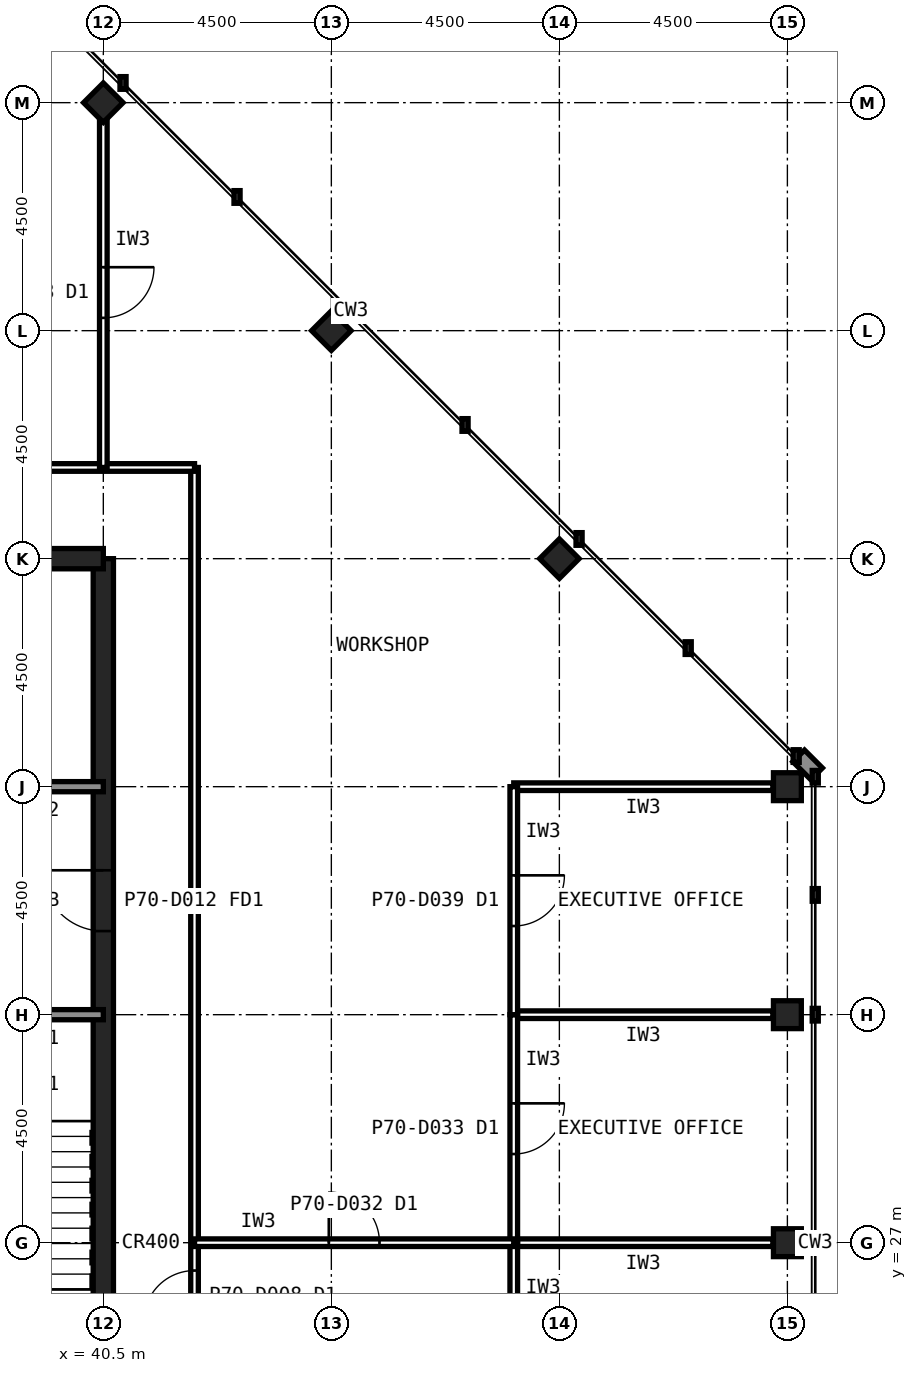
"""IFC4 building model, lengths in metres.
Left out: names, types, materials, properties, quantities, classifications, styles, units other than length and angle.
Written with IfcOpenShell. Run it as: python <this file> out.ifc"""

import sys

from ifc_helpers import new_model, si_unit, direction, frame, frame_2d, origin, origin_2d, place, context, subcontext, project, spatial, rectangle, hollow_rectangle, extrude, element, fill, save


model = new_model("IFC4")
c1 = context("Model", 3, precision=1e-05, world=origin(), true_north=direction((0.0, 1.0)))
c2 = subcontext(c1, "Body", "Model", "MODEL_VIEW")
j1 = project(units=[si_unit("LENGTHUNIT", "METRE"), si_unit("PLANEANGLEUNIT", "RADIAN")], contexts=[c1])
p1 = place(None, origin())
s1 = spatial("IfcSite", under=j1, at=p1, CompositionType="ELEMENT")
p2 = place(p1, origin())
s2 = spatial("IfcBuilding", under=s1, at=p2, CompositionType="ELEMENT")
p3 = place(p2, frame((0.0, 0.0, 294.6)))
s3 = spatial("IfcBuildingStorey", under=s2, at=p3, CompositionType="ELEMENT", Elevation=294.6)
for number, where, z_axis, x_axis in (
    (1, (54.0, 27.0, 0.0), (0.0, 0.0, 1.0), (1.0, 0.0, 0.0)),
    (2, (54.0, 31.5, 0.0), (0.0, 0.0, 1.0), (1.0, 0.0, 0.0)),
    (3, (54.0, 36.0, 0.0), (0.0, 0.0, 1.0), (1.0, 0.0, 0.0)),
    (4, (49.5, 40.5, 0.0), (0.0, 0.0, 1.0), (0.707, 0.707, 0.0)),
    (5, (45.0, 45.0, 0.0), (0.0, 0.0, 1.0), (0.707, 0.707, 0.0)),
    (6, (40.5, 49.5, 0.0), (0.0, 0.0, 1.0), (0.707, 0.707, 0.0)),
):
    element("IfcColumn", number, at=place(p3, frame(where, z_axis=z_axis, x_axis=x_axis)), inside=s3, PredefinedType="COLUMN", context=c2, shape_type="SweptSolid", body=[
        extrude(hollow_rectangle(XDim=0.55, YDim=0.55, WallThickness=0.025, at=origin_2d()), origin(), (0.0, 0.0, 1.0), 4.0),
    ])
p4 = place(p3, frame((40.5, 13.5, 0.0), z_axis=(0.0, 0.0, 1.0), x_axis=(0.0, 1.0, 0.0)))
e7 = element("IfcWall", 7, at=p4, inside=s3, PredefinedType="SHEAR", context=c2, shape_type="SweptSolid", body=[
    extrude(rectangle(XDim=27.0, YDim=0.4, at=frame_2d((13.5, 0.0))), origin(), (0.0, 0.0, 1.0), 4.0),
])
p5 = place(p4, frame((5.85, 0.0, 0.0)))
e8 = element("IfcOpeningElement", 8, at=p5, cuts=e7, PredefinedType="OPENING", context=c2, shape_type="SweptSolid", body=[
    extrude(rectangle(XDim=1.8, YDim=2.1, at=frame_2d((0.9, 1.05))), frame((0.0, 0.21, 0.0), z_axis=(0.0, -1.0, 0.0), x_axis=(1.0, 0.0, 0.0)), (0.0, 0.0, 1.0), 0.42),
])
p6 = place(p4, frame((19.65, 0.0, 0.0)))
e9 = element("IfcOpeningElement", 9, at=p6, cuts=e7, PredefinedType="OPENING", context=c2, shape_type="SweptSolid", body=[
    extrude(rectangle(XDim=1.2, YDim=2.1, at=frame_2d((0.6, 1.05))), frame((0.0, 0.21, 0.0), z_axis=(0.0, -1.0, 0.0), x_axis=(1.0, 0.0, 0.0)), (0.0, 0.0, 1.0), 0.42),
])
p7 = place(p3, frame((40.5, 40.5, 0.0), z_axis=(0.0, 0.0, 1.0), x_axis=(-1.0, 0.0, 0.0)))
e10 = element("IfcWall", 10, at=p7, inside=s3, PredefinedType="SHEAR", context=c2, shape_type="SweptSolid", body=[
    extrude(rectangle(XDim=27.0, YDim=0.4, at=frame_2d((13.5, 0.0))), origin(), (0.0, 0.0, 1.0), 4.0),
])
p8 = place(p3, frame((13.5, 36.0, 0.0), z_axis=(0.0, 0.0, 1.0), x_axis=(1.0, 0.0, 0.0)))
e11 = element("IfcWall", 11, at=p8, inside=s3, PredefinedType="SOLIDWALL", context=c2, shape_type="SweptSolid", body=[
    extrude(rectangle(XDim=27.0, YDim=0.2, at=frame_2d((13.5, 0.0))), origin(), (0.0, 0.0, 1.0), 3.84),
])
p9 = place(p8, frame((1.8, 0.0, 0.0)))
e12 = element("IfcOpeningElement", 12, at=p9, cuts=e11, PredefinedType="OPENING", context=c2, shape_type="SweptSolid", body=[
    extrude(rectangle(XDim=0.9, YDim=2.1, at=frame_2d((0.45, 1.05))), frame((0.0, 0.11, 0.0), z_axis=(0.0, -1.0, 0.0), x_axis=(1.0, 0.0, 0.0)), (0.0, 0.0, 1.0), 0.22),
])
p10 = place(p8, frame((5.55, 0.0, 0.0)))
e13 = element("IfcOpeningElement", 13, at=p10, cuts=e11, PredefinedType="OPENING", context=c2, shape_type="SweptSolid", body=[
    extrude(rectangle(XDim=0.9, YDim=2.1, at=frame_2d((0.45, 1.05))), frame((0.0, 0.11, 0.0), z_axis=(0.0, -1.0, 0.0), x_axis=(1.0, 0.0, 0.0)), (0.0, 0.0, 1.0), 0.22),
])
p11 = place(p8, frame((11.55, 0.0, 0.0)))
e14 = element("IfcOpeningElement", 14, at=p11, cuts=e11, PredefinedType="OPENING", context=c2, shape_type="SweptSolid", body=[
    extrude(rectangle(XDim=0.9, YDim=2.1, at=frame_2d((0.45, 1.05))), frame((0.0, 0.11, 0.0), z_axis=(0.0, -1.0, 0.0), x_axis=(1.0, 0.0, 0.0)), (0.0, 0.0, 1.0), 0.22),
])
p12 = place(p8, frame((14.55, 0.0, 0.0)))
e15 = element("IfcOpeningElement", 15, at=p12, cuts=e11, PredefinedType="OPENING", context=c2, shape_type="SweptSolid", body=[
    extrude(rectangle(XDim=0.9, YDim=2.1, at=frame_2d((0.45, 1.05))), frame((0.0, 0.11, 0.0), z_axis=(0.0, -1.0, 0.0), x_axis=(1.0, 0.0, 0.0)), (0.0, 0.0, 1.0), 0.22),
])
p13 = place(p8, frame((24.1, 0.0, 0.0)))
e16 = element("IfcOpeningElement", 16, at=p13, cuts=e11, PredefinedType="OPENING", context=c2, shape_type="SweptSolid", body=[
    extrude(rectangle(XDim=1.3, YDim=2.2, at=frame_2d((0.65, 1.1))), frame((0.0, 0.11, 0.0), z_axis=(0.0, -1.0, 0.0), x_axis=(1.0, 0.0, 0.0)), (0.0, 0.0, 1.0), 0.22),
])
p14 = place(p3, frame((13.5, 31.5, 0.0), z_axis=(0.0, 0.0, 1.0), x_axis=(1.0, 0.0, 0.0)))
e17 = element("IfcWall", 17, at=p14, inside=s3, PredefinedType="SOLIDWALL", context=c2, shape_type="SweptSolid", body=[
    extrude(rectangle(XDim=27.0, YDim=0.2, at=frame_2d((13.5, 0.0))), origin(), (0.0, 0.0, 1.0), 3.84),
])
p15 = place(p14, frame((24.15, 0.0, 0.0)))
e18 = element("IfcOpeningElement", 18, at=p15, cuts=e17, PredefinedType="OPENING", context=c2, shape_type="SweptSolid", body=[
    extrude(rectangle(XDim=1.2, YDim=2.1, at=frame_2d((0.6, 1.05))), frame((0.0, 0.11, 0.0), z_axis=(0.0, -1.0, 0.0), x_axis=(1.0, 0.0, 0.0)), (0.0, 0.0, 1.0), 0.22),
])
p16 = place(p14, frame((15.3, 0.0, 0.0)))
e19 = element("IfcOpeningElement", 19, at=p16, cuts=e17, PredefinedType="OPENING", context=c2, shape_type="SweptSolid", body=[
    extrude(rectangle(XDim=0.9, YDim=2.1, at=frame_2d((0.45, 1.05))), frame((0.0, 0.11, 0.0), z_axis=(0.0, -1.0, 0.0), x_axis=(1.0, 0.0, 0.0)), (0.0, 0.0, 1.0), 0.22),
])
p17 = place(p14, frame((19.8, 0.0, 0.0)))
e20 = element("IfcOpeningElement", 20, at=p17, cuts=e17, PredefinedType="OPENING", context=c2, shape_type="SweptSolid", body=[
    extrude(rectangle(XDim=0.9, YDim=2.1, at=frame_2d((0.45, 1.05))), frame((0.0, 0.11, 0.0), z_axis=(0.0, -1.0, 0.0), x_axis=(1.0, 0.0, 0.0)), (0.0, 0.0, 1.0), 0.22),
])
p18 = place(p3, frame((42.3, 11.7, 0.0), z_axis=(0.0, 0.0, 1.0), x_axis=(0.0, 1.0, 0.0)))
e21 = element("IfcWall", 21, at=p18, inside=s3, PredefinedType="PARTITIONING", context=c2, shape_type="SweptSolid", body=[
    extrude(rectangle(XDim=30.6, YDim=0.15, at=frame_2d((15.3, 0.0))), origin(), (0.0, 0.0, 1.0), 3.84),
])
p19 = place(p18, frame((13.75, 0.0, 0.0)))
e22 = element("IfcOpeningElement", 22, at=p19, cuts=e21, PredefinedType="OPENING", context=c2, shape_type="SweptSolid", body=[
    extrude(rectangle(XDim=1.0, YDim=2.1, at=frame_2d((0.5, 1.05))), frame((0.0, 0.085, 0.0), z_axis=(0.0, -1.0, 0.0), x_axis=(1.0, 0.0, 0.0)), (0.0, 0.0, 1.0), 0.17),
])
p20 = place(p3, frame((42.3, 42.3, 0.0), z_axis=(0.0, 0.0, 1.0), x_axis=(-1.0, 0.0, 0.0)))
e23 = element("IfcWall", 23, at=p20, inside=s3, PredefinedType="PARTITIONING", context=c2, shape_type="SweptSolid", body=[
    extrude(rectangle(XDim=30.6, YDim=0.15, at=frame_2d((15.3, 0.0))), origin(), (0.0, 0.0, 1.0), 3.84),
])
p21 = place(p20, frame((14.8, 0.0, 0.0)))
e24 = element("IfcOpeningElement", 24, at=p21, cuts=e23, PredefinedType="OPENING", context=c2, shape_type="SweptSolid", body=[
    extrude(rectangle(XDim=1.0, YDim=2.1, at=frame_2d((0.5, 1.05))), frame((0.0, 0.085, 0.0), z_axis=(0.0, -1.0, 0.0), x_axis=(1.0, 0.0, 0.0)), (0.0, 0.0, 1.0), 0.17),
])
p22 = place(p3, frame((53.715, 27.0, 0.0), z_axis=(0.0, 0.0, 1.0), x_axis=(-1.0, 0.0, 0.0)))
e25 = element("IfcWall", 25, at=p22, inside=s3, PredefinedType="PARTITIONING", context=c2, shape_type="SweptSolid", body=[
    extrude(rectangle(XDim=5.115, YDim=0.15, at=frame_2d((2.558, 0.0))), origin(), (0.0, 0.0, 1.0), 2.989),
])
p23 = place(p3, frame((48.6, 27.0, 0.0), z_axis=(0.0, 0.0, 1.0), x_axis=(0.0, -1.0, 0.0)))
e26 = element("IfcWall", 26, at=p23, inside=s3, PredefinedType="PARTITIONING", context=c2, shape_type="SweptSolid", body=[
    extrude(rectangle(XDim=4.5, YDim=0.15, at=frame_2d((2.25, 0.0))), origin(), (0.0, 0.0, 1.0), 3.84),
])
p24 = place(p23, frame((1.75, 0.0, 0.0)))
e27 = element("IfcOpeningElement", 27, at=p24, cuts=e26, PredefinedType="OPENING", context=c2, shape_type="SweptSolid", body=[
    extrude(rectangle(XDim=1.0, YDim=2.1, at=frame_2d((0.5, 1.05))), frame((0.0, 0.085, 0.0), z_axis=(0.0, -1.0, 0.0), x_axis=(1.0, 0.0, 0.0)), (0.0, 0.0, 1.0), 0.17),
])
p25 = place(p3, frame((53.715, 31.5, 0.0), z_axis=(0.0, 0.0, 1.0), x_axis=(-1.0, 0.0, 0.0)))
e28 = element("IfcWall", 28, at=p25, inside=s3, PredefinedType="PARTITIONING", context=c2, shape_type="SweptSolid", body=[
    extrude(rectangle(XDim=5.115, YDim=0.15, at=frame_2d((2.558, 0.0))), origin(), (0.0, 0.0, 1.0), 2.989),
])
p26 = place(p3, frame((48.6, 31.5, 0.0), z_axis=(0.0, 0.0, 1.0), x_axis=(0.0, -1.0, 0.0)))
e29 = element("IfcWall", 29, at=p26, inside=s3, PredefinedType="PARTITIONING", context=c2, shape_type="SweptSolid", body=[
    extrude(rectangle(XDim=4.5, YDim=0.15, at=frame_2d((2.25, 0.0))), origin(), (0.0, 0.0, 1.0), 3.84),
])
p27 = place(p26, frame((1.75, 0.0, 0.0)))
e30 = element("IfcOpeningElement", 30, at=p27, cuts=e29, PredefinedType="OPENING", context=c2, shape_type="SweptSolid", body=[
    extrude(rectangle(XDim=1.0, YDim=2.1, at=frame_2d((0.5, 1.05))), frame((0.0, 0.085, 0.0), z_axis=(0.0, -1.0, 0.0), x_axis=(1.0, 0.0, 0.0)), (0.0, 0.0, 1.0), 0.17),
])
p28 = place(p3, frame((53.715, 36.0, 0.0), z_axis=(0.0, 0.0, 1.0), x_axis=(-1.0, 0.0, 0.0)))
e31 = element("IfcWall", 31, at=p28, inside=s3, PredefinedType="PARTITIONING", context=c2, shape_type="SweptSolid", body=[
    extrude(rectangle(XDim=5.115, YDim=0.15, at=frame_2d((2.558, 0.0))), origin(), (0.0, 0.0, 1.0), 2.989),
])
p29 = place(p3, frame((48.6, 36.0, 0.0), z_axis=(0.0, 0.0, 1.0), x_axis=(0.0, -1.0, 0.0)))
e32 = element("IfcWall", 32, at=p29, inside=s3, PredefinedType="PARTITIONING", context=c2, shape_type="SweptSolid", body=[
    extrude(rectangle(XDim=4.5, YDim=0.15, at=frame_2d((2.25, 0.0))), origin(), (0.0, 0.0, 1.0), 3.84),
])
p30 = place(p29, frame((1.75, 0.0, 0.0)))
e33 = element("IfcOpeningElement", 33, at=p30, cuts=e32, PredefinedType="OPENING", context=c2, shape_type="SweptSolid", body=[
    extrude(rectangle(XDim=1.0, YDim=2.1, at=frame_2d((0.5, 1.05))), frame((0.0, 0.085, 0.0), z_axis=(0.0, -1.0, 0.0), x_axis=(1.0, 0.0, 0.0)), (0.0, 0.0, 1.0), 0.17),
])
p31 = place(p3, frame((40.5, 49.205, 0.0), z_axis=(0.0, 0.0, 1.0), x_axis=(0.0, -1.0, 0.0)))
e34 = element("IfcWall", 34, at=p31, inside=s3, PredefinedType="PARTITIONING", context=c2, shape_type="SweptSolid", body=[
    extrude(rectangle(XDim=6.905, YDim=0.15, at=frame_2d((3.453, 0.0))), origin(), (0.0, 0.0, 1.0), 2.989),
])
p32 = place(p31, frame((2.952, 0.0, 0.0)))
e35 = element("IfcOpeningElement", 35, at=p32, cuts=e34, PredefinedType="OPENING", context=c2, shape_type="SweptSolid", body=[
    extrude(rectangle(XDim=1.0, YDim=2.1, at=frame_2d((0.5, 1.05))), frame((0.0, 0.085, 0.0), z_axis=(0.0, -1.0, 0.0), x_axis=(1.0, 0.0, 0.0)), (0.0, 0.0, 1.0), 0.17),
])
p33 = place(p3, frame((42.3, 27.0, 0.0), z_axis=(0.0, 0.0, 1.0), x_axis=(1.0, 0.0, 0.0)))
e36 = element("IfcWall", 36, at=p33, inside=s3, PredefinedType="PARTITIONING", context=c2, shape_type="SweptSolid", body=[
    extrude(rectangle(XDim=6.3, YDim=0.15, at=frame_2d((3.15, 0.0))), origin(), (0.0, 0.0, 1.0), 2.989),
])
p34 = place(p33, frame((2.65, 0.0, 0.0)))
e37 = element("IfcOpeningElement", 37, at=p34, cuts=e36, PredefinedType="OPENING", context=c2, shape_type="SweptSolid", body=[
    extrude(rectangle(XDim=1.0, YDim=2.1, at=frame_2d((0.5, 1.05))), frame((0.0, 0.085, 0.0), z_axis=(0.0, -1.0, 0.0), x_axis=(1.0, 0.0, 0.0)), (0.0, 0.0, 1.0), 0.17),
])
p35 = place(p6, origin())
e38 = element("IfcDoor", 38, at=p35, inside=s3, OperationType="SINGLE_SWING_RIGHT", PredefinedType="DOOR", context=c2, shape_type="SweptSolid", body=[
    extrude(rectangle(XDim=1.2, YDim=2.1, at=frame_2d((0.6, 1.05))), frame((0.0, 0.025, 0.0), z_axis=(0.0, -1.0, 0.0), x_axis=(1.0, 0.0, 0.0)), (0.0, 0.0, 1.0), 0.05),
])
fill(e9, e38)
p36 = place(p19, origin())
e39 = element("IfcDoor", 39, at=p36, inside=s3, OperationType="SINGLE_SWING_LEFT", PredefinedType="DOOR", context=c2, shape_type="SweptSolid", body=[
    extrude(rectangle(XDim=1.0, YDim=2.1, at=frame_2d((0.5, 1.05))), frame((0.0, 0.025, 0.0), z_axis=(0.0, -1.0, 0.0), x_axis=(1.0, 0.0, 0.0)), (0.0, 0.0, 1.0), 0.05),
])
fill(e22, e39)
p37 = place(p27, origin())
e40 = element("IfcDoor", 40, at=p37, inside=s3, OperationType="SINGLE_SWING_LEFT", PredefinedType="DOOR", context=c2, shape_type="SweptSolid", body=[
    extrude(rectangle(XDim=1.0, YDim=2.1, at=frame_2d((0.5, 1.05))), frame((0.0, 0.025, 0.0), z_axis=(0.0, -1.0, 0.0), x_axis=(1.0, 0.0, 0.0)), (0.0, 0.0, 1.0), 0.05),
])
fill(e30, e40)
p38 = place(p30, origin())
e41 = element("IfcDoor", 41, at=p38, inside=s3, OperationType="SINGLE_SWING_LEFT", PredefinedType="DOOR", context=c2, shape_type="SweptSolid", body=[
    extrude(rectangle(XDim=1.0, YDim=2.1, at=frame_2d((0.5, 1.05))), frame((0.0, 0.025, 0.0), z_axis=(0.0, -1.0, 0.0), x_axis=(1.0, 0.0, 0.0)), (0.0, 0.0, 1.0), 0.05),
])
fill(e33, e41)
p39 = place(p32, origin())
e42 = element("IfcDoor", 42, at=p39, inside=s3, OperationType="SINGLE_SWING_LEFT", PredefinedType="DOOR", context=c2, shape_type="SweptSolid", body=[
    extrude(rectangle(XDim=1.0, YDim=2.1, at=frame_2d((0.5, 1.05))), frame((0.0, 0.025, 0.0), z_axis=(0.0, -1.0, 0.0), x_axis=(1.0, 0.0, 0.0)), (0.0, 0.0, 1.0), 0.05),
])
fill(e35, e42)
p40 = place(p34, origin())
e43 = element("IfcDoor", 43, at=p40, inside=s3, OperationType="SINGLE_SWING_LEFT", PredefinedType="DOOR", context=c2, shape_type="SweptSolid", body=[
    extrude(rectangle(XDim=1.0, YDim=2.1, at=frame_2d((0.5, 1.05))), frame((0.0, 0.025, 0.0), z_axis=(0.0, -1.0, 0.0), x_axis=(1.0, 0.0, 0.0)), (0.0, 0.0, 1.0), 0.05),
])
fill(e37, e43)
save(model, sys.argv[1])
